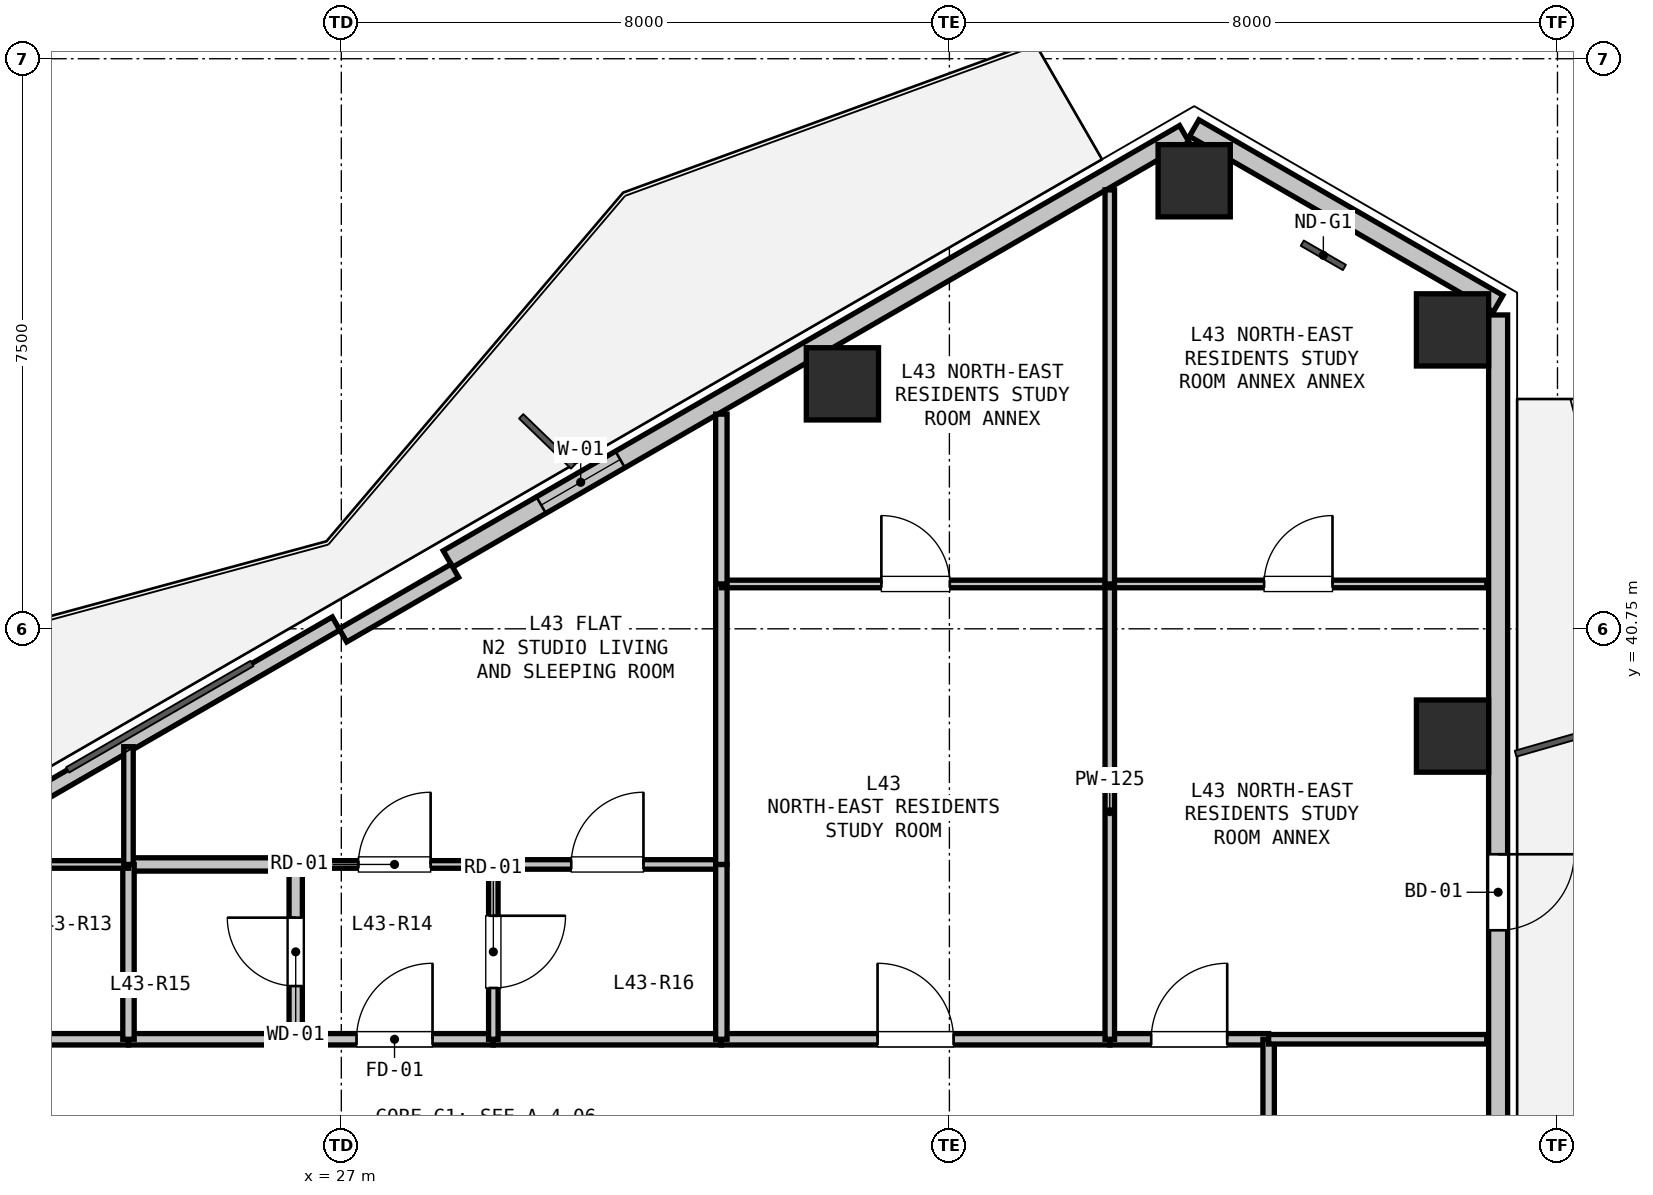
"""IFC4 building model, lengths in metres.
Left out: names, types, materials, properties, quantities, classifications, styles, units other than length and angle.
Written with IfcOpenShell. Run it as: python <this file> out.ifc"""

import sys

from ifc_helpers import new_model, si_unit, direction, frame, frame_2d, origin, origin_2d, place, context, subcontext, project, spatial, rectangle, hollow_rectangle, extrude, element, fill, save


model = new_model("IFC4")
c1 = context("Model", 3, precision=1e-05, world=origin(), true_north=direction((0.0, 1.0)))
c2 = subcontext(c1, "Body", "Model", "MODEL_VIEW")
j1 = project(units=[si_unit("LENGTHUNIT", "METRE"), si_unit("PLANEANGLEUNIT", "RADIAN")], contexts=[c1])
p1 = place(None, origin())
s1 = spatial("IfcSite", under=j1, at=p1, CompositionType="ELEMENT")
p2 = place(p1, origin())
s2 = spatial("IfcBuilding", under=s1, at=p2, CompositionType="ELEMENT")
p3 = place(p2, frame((0.0, 0.0, 154.2)))
s3 = spatial("IfcBuildingStorey", under=s2, at=p3, CompositionType="ELEMENT", Elevation=154.2)
for number, where, z_axis, x_axis in (
    (1, (33.593, 43.973, 0.0), (0.0, 0.0, 1.0), (1.0, 0.0, 0.0)),
    (2, (38.22, 46.645, 0.0), (0.0, 0.0, 1.0), (1.0, 0.0, 0.0)),
    (3, (41.619, 44.683, 0.0), (0.0, 0.0, 1.0), (1.0, 0.0, 0.0)),
    (4, (41.619, 39.339, 0.0), (0.0, 0.0, 1.0), (1.0, 0.0, 0.0)),
):
    element("IfcColumn", number, at=place(p3, frame(where, z_axis=z_axis, x_axis=x_axis)), inside=s3, PredefinedType="COLUMN", context=c2, shape_type="SweptSolid", body=[
        extrude(hollow_rectangle(XDim=0.95, YDim=0.95, WallThickness=0.028, at=origin_2d()), origin(), (0.0, 0.0, 1.0), 3.3),
    ])
p4 = place(p3, frame((38.22, 47.338, 0.0), z_axis=(0.0, 0.0, 1.0), x_axis=(0.866035021055, -0.499983342029, 0.0)))
e5 = element("IfcWall", 5, at=p4, inside=s3, PredefinedType="SOLIDWALL", context=c2, shape_type="SweptSolid", body=[
    extrude(rectangle(XDim=4.617, YDim=0.25, at=frame_2d((2.309, 0.0))), origin(), (0.0, 0.0, 1.0), 2.68),
])
p5 = place(p3, frame((17.85, 35.577, 0.0), z_axis=(0.0, 0.0, 1.0), x_axis=(0.866026619769, 0.499997893847, 0.0)))
e6 = element("IfcWall", 6, at=p5, inside=s3, PredefinedType="PARAPET", context=c2, shape_type="SweptSolid", body=[
    extrude(rectangle(XDim=10.486, YDim=0.2, at=frame_2d((5.243, 0.0))), origin(), (0.0, 0.0, 1.0), 0.2),
])
p6 = place(p3, frame((28.403, 41.67, 0.0), z_axis=(0.0, 0.0, 1.0), x_axis=(0.86602239209, 0.500005216371, 0.0)))
e7 = element("IfcWall", 7, at=p6, inside=s3, PredefinedType="SOLIDWALL", context=c2, shape_type="SweptSolid", body=[
    extrude(rectangle(XDim=11.186, YDim=0.25, at=frame_2d((5.593, 0.0))), origin(), (0.0, 0.0, 1.0), 2.68),
])
p7 = place(p6, frame((1.416, 0.0, 0.9)))
e8 = element("IfcOpeningElement", 8, at=p7, cuts=e7, PredefinedType="OPENING", context=c2, shape_type="SweptSolid", body=[
    extrude(rectangle(XDim=1.2, YDim=1.4, at=frame_2d((0.6, 0.7))), frame((0.0, 0.135, 0.0), z_axis=(0.0, -1.0, 0.0), x_axis=(1.0, 0.0, 0.0)), (0.0, 0.0, 1.0), 0.27),
])
p8 = place(p3, frame((27.021, 40.664, 0.0), z_axis=(0.0, 0.0, 1.0), x_axis=(0.86605165483, 0.499954529098, 0.0)))
e9 = element("IfcWall", 9, at=p8, inside=s3, PredefinedType="PARAPET", context=c2, shape_type="SweptSolid", body=[
    extrude(rectangle(XDim=1.7, YDim=0.2, at=frame_2d((0.85, 0.0))), origin(), (0.0, 0.0, 1.0), 2.68),
])
p9 = place(p3, frame((42.219, 44.879, 0.0), z_axis=(0.0, 0.0, 1.0), x_axis=(0.0, -1.0, 0.0)))
e10 = element("IfcWall", 10, at=p9, inside=s3, PredefinedType="SOLIDWALL", context=c2, shape_type="SweptSolid", body=[
    extrude(rectangle(XDim=11.186, YDim=0.25, at=frame_2d((5.593, 0.0))), origin(), (0.0, 0.0, 1.0), 2.68),
])
p10 = place(p9, frame((7.095, 0.0, 0.0)))
e11 = element("IfcOpeningElement", 11, at=p10, cuts=e10, PredefinedType="OPENING", context=c2, shape_type="SweptSolid", body=[
    extrude(rectangle(XDim=1.0, YDim=2.1, at=frame_2d((0.5, 1.05))), frame((0.0, 0.135, 0.0), z_axis=(0.0, -1.0, 0.0), x_axis=(1.0, 0.0, 0.0)), (0.0, 0.0, 1.0), 0.27),
])
p11 = place(p3, frame((21.0, 35.35, 0.0), z_axis=(0.0, 0.0, 1.0), x_axis=(1.0, 0.0, 0.0)))
e12 = element("IfcWall", 12, at=p11, inside=s3, PredefinedType="PARTITIONING", context=c2, shape_type="SweptSolid", body=[
    extrude(rectangle(XDim=3.2, YDim=0.15, at=frame_2d((1.6, 0.0))), origin(), (0.0, 0.0, 1.0), 3.06),
])
p12 = place(p11, frame((1.1, 0.0, 0.0)))
e13 = element("IfcOpeningElement", 13, at=p12, cuts=e12, PredefinedType="OPENING", context=c2, shape_type="SweptSolid", body=[
    extrude(rectangle(XDim=1.0, YDim=2.15, at=frame_2d((0.5, 1.075))), frame((0.0, 0.085, 0.0), z_axis=(0.0, -1.0, 0.0), x_axis=(1.0, 0.0, 0.0)), (0.0, 0.0, 1.0), 0.17),
])
p13 = place(p3, frame((24.2, 35.35, 0.0), z_axis=(0.0, 0.0, 1.0), x_axis=(1.0, 0.0, 0.0)))
e14 = element("IfcWall", 14, at=p13, inside=s3, PredefinedType="PARTITIONING", context=c2, shape_type="SweptSolid", body=[
    extrude(rectangle(XDim=2.2, YDim=0.15, at=frame_2d((1.1, 0.0))), origin(), (0.0, 0.0, 1.0), 3.06),
])
p14 = place(p3, frame((26.4, 35.35, 0.0), z_axis=(0.0, 0.0, 1.0), x_axis=(1.0, 0.0, 0.0)))
e15 = element("IfcWall", 15, at=p14, inside=s3, PredefinedType="PARTITIONING", context=c2, shape_type="SweptSolid", body=[
    extrude(rectangle(XDim=2.6, YDim=0.15, at=frame_2d((1.3, 0.0))), origin(), (0.0, 0.0, 1.0), 3.06),
])
p15 = place(p14, frame((0.8, 0.0, 0.0)))
e16 = element("IfcOpeningElement", 16, at=p15, cuts=e15, PredefinedType="OPENING", context=c2, shape_type="SweptSolid", body=[
    extrude(rectangle(XDim=1.0, YDim=2.15, at=frame_2d((0.5, 1.075))), frame((0.0, 0.085, 0.0), z_axis=(0.0, -1.0, 0.0), x_axis=(1.0, 0.0, 0.0)), (0.0, 0.0, 1.0), 0.17),
])
p16 = place(p3, frame((29.0, 35.35, 0.0), z_axis=(0.0, 0.0, 1.0), x_axis=(1.0, 0.0, 0.0)))
e17 = element("IfcWall", 17, at=p16, inside=s3, PredefinedType="PARTITIONING", context=c2, shape_type="SweptSolid", body=[
    extrude(rectangle(XDim=3.0, YDim=0.15, at=frame_2d((1.5, 0.0))), origin(), (0.0, 0.0, 1.0), 3.06),
])
p17 = place(p3, frame((32.0, 35.35, 0.0), z_axis=(0.0, 0.0, 1.0), x_axis=(1.0, 0.0, 0.0)))
e18 = element("IfcWall", 18, at=p17, inside=s3, PredefinedType="PARTITIONING", context=c2, shape_type="SweptSolid", body=[
    extrude(rectangle(XDim=5.11, YDim=0.15, at=frame_2d((2.555, 0.0))), origin(), (0.0, 0.0, 1.0), 2.433),
])
p18 = place(p17, frame((2.055, 0.0, 0.0)))
e19 = element("IfcOpeningElement", 19, at=p18, cuts=e18, PredefinedType="OPENING", context=c2, shape_type="SweptSolid", body=[
    extrude(rectangle(XDim=1.0, YDim=2.15, at=frame_2d((0.5, 1.075))), frame((0.0, 0.085, 0.0), z_axis=(0.0, -1.0, 0.0), x_axis=(1.0, 0.0, 0.0)), (0.0, 0.0, 1.0), 0.17),
])
p19 = place(p3, frame((37.11, 35.35, 0.0), z_axis=(0.0, 0.0, 1.0), x_axis=(1.0, 0.0, 0.0)))
e20 = element("IfcWall", 20, at=p19, inside=s3, PredefinedType="PARTITIONING", context=c2, shape_type="SweptSolid", body=[
    extrude(rectangle(XDim=2.09, YDim=0.15, at=frame_2d((1.045, 0.0))), origin(), (0.0, 0.0, 1.0), 2.433),
])
p20 = place(p19, frame((0.545, 0.0, 0.0)))
e21 = element("IfcOpeningElement", 21, at=p20, cuts=e20, PredefinedType="OPENING", context=c2, shape_type="SweptSolid", body=[
    extrude(rectangle(XDim=1.0, YDim=2.15, at=frame_2d((0.5, 1.075))), frame((0.0, 0.085, 0.0), z_axis=(0.0, -1.0, 0.0), x_axis=(1.0, 0.0, 0.0)), (0.0, 0.0, 1.0), 0.17),
])
p21 = place(p3, frame((39.2, 35.35, 0.0), z_axis=(0.0, 0.0, 1.0), x_axis=(0.0, -1.0, 0.0)))
e22 = element("IfcWall", 22, at=p21, inside=s3, PredefinedType="PARTITIONING", context=c2, shape_type="SweptSolid", body=[
    extrude(rectangle(XDim=1.75, YDim=0.15, at=frame_2d((0.875, 0.0))), origin(), (0.0, 0.0, 1.0), 3.06),
])
p22 = place(p3, frame((26.4, 37.65, 0.0), z_axis=(0.0, 0.0, 1.0), x_axis=(1.0, 0.0, 0.0)))
e23 = element("IfcWall", 23, at=p22, inside=s3, PredefinedType="PARTITIONING", context=c2, shape_type="SweptSolid", body=[
    extrude(rectangle(XDim=2.6, YDim=0.1, at=frame_2d((1.3, 0.0))), origin(), (0.0, 0.0, 1.0), 3.06),
])
p23 = place(p22, frame((0.825, 0.0, 0.0)))
e24 = element("IfcOpeningElement", 24, at=p23, cuts=e23, PredefinedType="OPENING", context=c2, shape_type="SweptSolid", body=[
    extrude(rectangle(XDim=0.95, YDim=2.1, at=frame_2d((0.475, 1.05))), frame((0.0, 0.06, 0.0), z_axis=(0.0, -1.0, 0.0), x_axis=(1.0, 0.0, 0.0)), (0.0, 0.0, 1.0), 0.12),
])
p24 = place(p3, frame((29.0, 37.65, 0.0), z_axis=(0.0, 0.0, 1.0), x_axis=(0.0, -1.0, 0.0)))
e25 = element("IfcWall", 25, at=p24, inside=s3, PredefinedType="PARTITIONING", context=c2, shape_type="SweptSolid", body=[
    extrude(rectangle(XDim=2.3, YDim=0.125, at=frame_2d((1.15, 0.0))), origin(), (0.0, 0.0, 1.0), 3.06),
])
p25 = place(p24, frame((0.675, 0.0, 0.0)))
e26 = element("IfcOpeningElement", 26, at=p25, cuts=e25, PredefinedType="OPENING", context=c2, shape_type="SweptSolid", body=[
    extrude(rectangle(XDim=0.95, YDim=2.1, at=frame_2d((0.475, 1.05))), frame((0.0, 0.073, 0.0), z_axis=(0.0, -1.0, 0.0), x_axis=(1.0, 0.0, 0.0)), (0.0, 0.0, 1.0), 0.145),
])
p26 = place(p3, frame((26.4, 35.35, 0.0), z_axis=(0.0, 0.0, 1.0), x_axis=(0.0, 1.0, 0.0)))
e27 = element("IfcWall", 27, at=p26, inside=s3, PredefinedType="PLUMBINGWALL", context=c2, shape_type="SweptSolid", body=[
    extrude(rectangle(XDim=2.3, YDim=0.175, at=frame_2d((1.15, 0.0))), origin(), (0.0, 0.0, 1.0), 3.06),
])
p27 = place(p26, frame((0.7, 0.0, 0.0)))
e28 = element("IfcOpeningElement", 28, at=p27, cuts=e27, PredefinedType="OPENING", context=c2, shape_type="SweptSolid", body=[
    extrude(rectangle(XDim=0.9, YDim=2.1, at=frame_2d((0.45, 1.05))), frame((0.0, 0.097, 0.0), z_axis=(0.0, -1.0, 0.0), x_axis=(1.0, 0.0, 0.0)), (0.0, 0.0, 1.0), 0.195),
])
p28 = place(p3, frame((24.2, 37.65, 0.0), z_axis=(0.0, 0.0, 1.0), x_axis=(1.0, 0.0, 0.0)))
e29 = element("IfcWall", 29, at=p28, inside=s3, PredefinedType="PLUMBINGWALL", context=c2, shape_type="SweptSolid", body=[
    extrude(rectangle(XDim=2.2, YDim=0.175, at=frame_2d((1.1, 0.0))), origin(), (0.0, 0.0, 1.0), 3.06),
])
p29 = place(p3, frame((24.2, 35.35, 0.0), z_axis=(0.0, 0.0, 1.0), x_axis=(0.0, 1.0, 0.0)))
e30 = element("IfcWall", 30, at=p29, inside=s3, PredefinedType="PARTITIONING", context=c2, shape_type="SweptSolid", body=[
    extrude(rectangle(XDim=2.3, YDim=0.15, at=frame_2d((1.15, 0.0))), origin(), (0.0, 0.0, 1.0), 3.06),
])
p30 = place(p3, frame((29.0, 37.65, 0.0), z_axis=(0.0, 0.0, 1.0), x_axis=(1.0, 0.0, 0.0)))
e31 = element("IfcWall", 31, at=p30, inside=s3, PredefinedType="PARTITIONING", context=c2, shape_type="SweptSolid", body=[
    extrude(rectangle(XDim=3.0, YDim=0.125, at=frame_2d((1.5, 0.0))), origin(), (0.0, 0.0, 1.0), 3.06),
])
p31 = place(p30, frame((1.025, 0.0, 0.0)))
e32 = element("IfcOpeningElement", 32, at=p31, cuts=e31, PredefinedType="OPENING", context=c2, shape_type="SweptSolid", body=[
    extrude(rectangle(XDim=0.95, YDim=2.1, at=frame_2d((0.475, 1.05))), frame((0.0, 0.073, 0.0), z_axis=(0.0, -1.0, 0.0), x_axis=(1.0, 0.0, 0.0)), (0.0, 0.0, 1.0), 0.145),
])
p32 = place(p3, frame((32.0, 37.65, 0.0), z_axis=(0.0, 0.0, 1.0), x_axis=(0.0, -1.0, 0.0)))
e33 = element("IfcWall", 33, at=p32, inside=s3, PredefinedType="PARTITIONING", context=c2, shape_type="SweptSolid", body=[
    extrude(rectangle(XDim=2.3, YDim=0.15, at=frame_2d((1.15, 0.0))), origin(), (0.0, 0.0, 1.0), 3.06),
])
p33 = place(p3, frame((32.0, 37.65, 0.0), z_axis=(0.0, 0.0, 1.0), x_axis=(0.0, 1.0, 0.0)))
e34 = element("IfcWall", 34, at=p33, inside=s3, PredefinedType="PARTITIONING", context=c2, shape_type="SweptSolid", body=[
    extrude(rectangle(XDim=3.69, YDim=0.15, at=frame_2d((1.845, 0.0))), origin(), (0.0, 0.0, 1.0), 3.06),
])
p34 = place(p3, frame((32.0, 41.34, 0.0), z_axis=(0.0, 0.0, 1.0), x_axis=(1.0, 0.0, 0.0)))
e35 = element("IfcWall", 35, at=p34, inside=s3, PredefinedType="PARTITIONING", context=c2, shape_type="SweptSolid", body=[
    extrude(rectangle(XDim=5.11, YDim=0.1, at=frame_2d((2.555, 0.0))), origin(), (0.0, 0.0, 1.0), 3.06),
])
p35 = place(p34, frame((2.105, 0.0, 0.0)))
e36 = element("IfcOpeningElement", 36, at=p35, cuts=e35, PredefinedType="OPENING", context=c2, shape_type="SweptSolid", body=[
    extrude(rectangle(XDim=0.9, YDim=2.1, at=frame_2d((0.45, 1.05))), frame((0.0, 0.06, 0.0), z_axis=(0.0, -1.0, 0.0), x_axis=(1.0, 0.0, 0.0)), (0.0, 0.0, 1.0), 0.12),
])
p36 = place(p3, frame((37.11, 41.34, 0.0), z_axis=(0.0, 0.0, 1.0), x_axis=(0.0, -1.0, 0.0)))
e37 = element("IfcWall", 37, at=p36, inside=s3, PredefinedType="PARTITIONING", context=c2, shape_type="SweptSolid", body=[
    extrude(rectangle(XDim=5.99, YDim=0.125, at=frame_2d((2.995, 0.0))), origin(), (0.0, 0.0, 1.0), 2.433),
])
p37 = place(p3, frame((37.11, 41.34, 0.0), z_axis=(0.0, 0.0, 1.0), x_axis=(1.0, 0.0, 0.0)))
e38 = element("IfcWall", 38, at=p37, inside=s3, PredefinedType="PARTITIONING", context=c2, shape_type="SweptSolid", body=[
    extrude(rectangle(XDim=4.96, YDim=0.1, at=frame_2d((2.48, 0.0))), origin(), (0.0, 0.0, 1.0), 2.433),
])
p38 = place(p37, frame((2.03, 0.0, 0.0)))
e39 = element("IfcOpeningElement", 39, at=p38, cuts=e38, PredefinedType="OPENING", context=c2, shape_type="SweptSolid", body=[
    extrude(rectangle(XDim=0.9, YDim=2.1, at=frame_2d((0.45, 1.05))), frame((0.0, 0.06, 0.0), z_axis=(0.0, -1.0, 0.0), x_axis=(1.0, 0.0, 0.0)), (0.0, 0.0, 1.0), 0.12),
])
p39 = place(p3, frame((42.07, 35.35, 0.0), z_axis=(0.0, 0.0, 1.0), x_axis=(-1.0, 0.0, 0.0)))
e40 = element("IfcWall", 40, at=p39, inside=s3, PredefinedType="PARTITIONING", context=c2, shape_type="SweptSolid", body=[
    extrude(rectangle(XDim=2.87, YDim=0.125, at=frame_2d((1.435, 0.0))), origin(), (0.0, 0.0, 1.0), 2.365),
])
p40 = place(p3, frame((32.0, 41.34, 0.0), z_axis=(0.0, 0.0, 1.0), x_axis=(0.0, 1.0, 0.0)))
e41 = element("IfcWall", 41, at=p40, inside=s3, PredefinedType="PARTITIONING", context=c2, shape_type="SweptSolid", body=[
    extrude(rectangle(XDim=2.234, YDim=0.15, at=frame_2d((1.117, 0.0))), origin(), (0.0, 0.0, 1.0), 2.365),
])
p41 = place(p3, frame((37.11, 46.524, 0.0), z_axis=(0.0, 0.0, 1.0), x_axis=(0.0, -1.0, 0.0)))
e42 = element("IfcWall", 42, at=p41, inside=s3, PredefinedType="PARTITIONING", context=c2, shape_type="SweptSolid", body=[
    extrude(rectangle(XDim=5.184, YDim=0.125, at=frame_2d((2.592, 0.0))), origin(), (0.0, 0.0, 1.0), 2.725),
])
p42 = place(p3, frame((21.51, 37.65, 0.0), z_axis=(0.0, 0.0, 1.0), x_axis=(1.0, 0.0, 0.0)))
e43 = element("IfcWall", 43, at=p42, inside=s3, PredefinedType="PARTITIONING", context=c2, shape_type="SweptSolid", body=[
    extrude(rectangle(XDim=2.69, YDim=0.1, at=frame_2d((1.345, 0.0))), origin(), (0.0, 0.0, 1.0), 2.365),
])
p43 = place(p3, frame((24.2, 37.65, 0.0), z_axis=(0.0, 0.0, 1.0), x_axis=(0.0, 1.0, 0.0)))
e44 = element("IfcWall", 44, at=p43, inside=s3, PredefinedType="PARTITIONING", context=c2, shape_type="SweptSolid", body=[
    extrude(rectangle(XDim=1.549, YDim=0.125, at=frame_2d((0.774, 0.0))), origin(), (0.0, 0.0, 1.0), 2.365),
])
p44 = place(p7, origin())
e45 = element("IfcWindow", 45, at=p44, inside=s3, PartitioningType="SINGLE_PANEL", PredefinedType="WINDOW", context=c2, shape_type="SweptSolid", body=[
    extrude(rectangle(XDim=1.2, YDim=1.4, at=frame_2d((0.6, 0.7))), frame((0.0, 0.03, 0.0), z_axis=(0.0, -1.0, 0.0), x_axis=(1.0, 0.0, 0.0)), (0.0, 0.0, 1.0), 0.06),
])
fill(e8, e45)
p45 = place(p10, origin())
e46 = element("IfcDoor", 46, at=p45, inside=s3, OperationType="SINGLE_SWING_LEFT", PredefinedType="DOOR", context=c2, shape_type="SweptSolid", body=[
    extrude(rectangle(XDim=1.0, YDim=2.1, at=frame_2d((0.5, 1.05))), frame((0.0, 0.025, 0.0), z_axis=(0.0, -1.0, 0.0), x_axis=(1.0, 0.0, 0.0)), (0.0, 0.0, 1.0), 0.05),
])
fill(e11, e46)
p46 = place(p15, origin())
e47 = element("IfcDoor", 47, at=p46, inside=s3, OperationType="SINGLE_SWING_RIGHT", PredefinedType="DOOR", context=c2, shape_type="SweptSolid", body=[
    extrude(rectangle(XDim=1.0, YDim=2.15, at=frame_2d((0.5, 1.075))), frame((0.0, 0.025, 0.0), z_axis=(0.0, -1.0, 0.0), x_axis=(1.0, 0.0, 0.0)), (0.0, 0.0, 1.0), 0.05),
])
fill(e16, e47)
p47 = place(p18, origin())
e48 = element("IfcDoor", 48, at=p47, inside=s3, OperationType="SINGLE_SWING_LEFT", PredefinedType="DOOR", context=c2, shape_type="SweptSolid", body=[
    extrude(rectangle(XDim=1.0, YDim=2.15, at=frame_2d((0.5, 1.075))), frame((0.0, 0.025, 0.0), z_axis=(0.0, -1.0, 0.0), x_axis=(1.0, 0.0, 0.0)), (0.0, 0.0, 1.0), 0.05),
])
fill(e19, e48)
p48 = place(p20, origin())
e49 = element("IfcDoor", 49, at=p48, inside=s3, OperationType="SINGLE_SWING_RIGHT", PredefinedType="DOOR", context=c2, shape_type="SweptSolid", body=[
    extrude(rectangle(XDim=1.0, YDim=2.15, at=frame_2d((0.5, 1.075))), frame((0.0, 0.025, 0.0), z_axis=(0.0, -1.0, 0.0), x_axis=(1.0, 0.0, 0.0)), (0.0, 0.0, 1.0), 0.05),
])
fill(e21, e49)
p49 = place(p27, origin())
e50 = element("IfcDoor", 50, at=p49, inside=s3, OperationType="SINGLE_SWING_RIGHT", PredefinedType="DOOR", context=c2, shape_type="SweptSolid", body=[
    extrude(rectangle(XDim=0.9, YDim=2.1, at=frame_2d((0.45, 1.05))), frame((0.0, 0.025, 0.0), z_axis=(0.0, -1.0, 0.0), x_axis=(1.0, 0.0, 0.0)), (0.0, 0.0, 1.0), 0.05),
])
fill(e28, e50)
p50 = place(p25, origin())
e51 = element("IfcDoor", 51, at=p50, inside=s3, OperationType="SINGLE_SWING_LEFT", PredefinedType="DOOR", context=c2, shape_type="SweptSolid", body=[
    extrude(rectangle(XDim=0.95, YDim=2.1, at=frame_2d((0.475, 1.05))), frame((0.0, 0.025, 0.0), z_axis=(0.0, -1.0, 0.0), x_axis=(1.0, 0.0, 0.0)), (0.0, 0.0, 1.0), 0.05),
])
fill(e26, e51)
p51 = place(p23, origin())
e52 = element("IfcDoor", 52, at=p51, inside=s3, OperationType="SINGLE_SWING_RIGHT", PredefinedType="DOOR", context=c2, shape_type="SweptSolid", body=[
    extrude(rectangle(XDim=0.95, YDim=2.1, at=frame_2d((0.475, 1.05))), frame((0.0, 0.025, 0.0), z_axis=(0.0, -1.0, 0.0), x_axis=(1.0, 0.0, 0.0)), (0.0, 0.0, 1.0), 0.05),
])
fill(e24, e52)
p52 = place(p31, origin())
e53 = element("IfcDoor", 53, at=p52, inside=s3, OperationType="SINGLE_SWING_RIGHT", PredefinedType="DOOR", context=c2, shape_type="SweptSolid", body=[
    extrude(rectangle(XDim=0.95, YDim=2.1, at=frame_2d((0.475, 1.05))), frame((0.0, 0.025, 0.0), z_axis=(0.0, -1.0, 0.0), x_axis=(1.0, 0.0, 0.0)), (0.0, 0.0, 1.0), 0.05),
])
fill(e32, e53)
p53 = place(p35, origin())
e54 = element("IfcDoor", 54, at=p53, inside=s3, OperationType="SINGLE_SWING_LEFT", PredefinedType="DOOR", context=c2, shape_type="SweptSolid", body=[
    extrude(rectangle(XDim=0.9, YDim=2.1, at=frame_2d((0.45, 1.05))), frame((0.0, 0.025, 0.0), z_axis=(0.0, -1.0, 0.0), x_axis=(1.0, 0.0, 0.0)), (0.0, 0.0, 1.0), 0.05),
])
fill(e36, e54)
p54 = place(p38, origin())
e55 = element("IfcDoor", 55, at=p54, inside=s3, OperationType="SINGLE_SWING_RIGHT", PredefinedType="DOOR", context=c2, shape_type="SweptSolid", body=[
    extrude(rectangle(XDim=0.9, YDim=2.1, at=frame_2d((0.45, 1.05))), frame((0.0, 0.025, 0.0), z_axis=(0.0, -1.0, 0.0), x_axis=(1.0, 0.0, 0.0)), (0.0, 0.0, 1.0), 0.05),
])
fill(e39, e55)
save(model, sys.argv[1])
